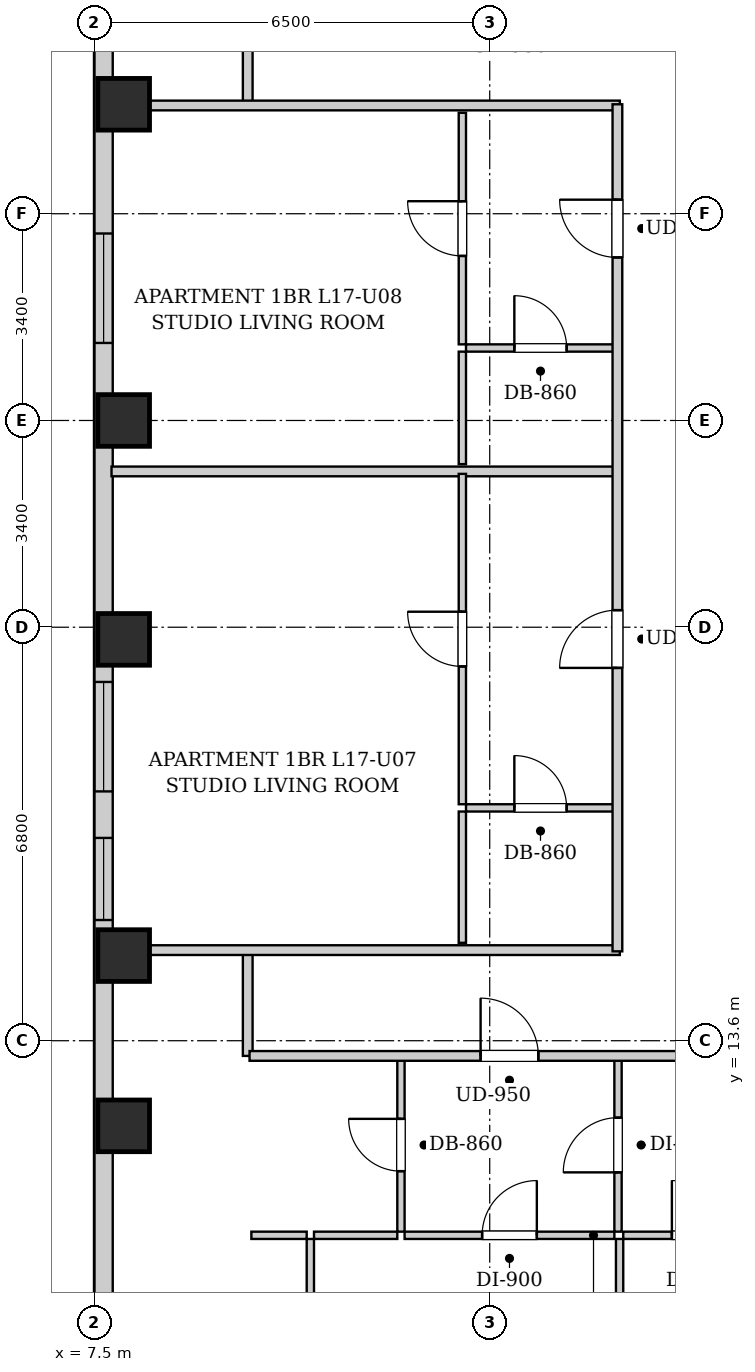
"""IFC4 building model, lengths in metres.
Left out: names, types, materials, properties, quantities, classifications, styles, units other than length and angle.
Written with IfcOpenShell. Run it as: python <this file> out.ifc"""

import sys

from ifc_helpers import new_model, si_unit, direction, frame, frame_2d, origin, origin_2d, place, context, subcontext, project, spatial, rectangle, extrude, element, fill, save


model = new_model("IFC4")
c1 = context("Model", 3, precision=1e-05, world=origin(), true_north=direction((0.0, 1.0)))
c2 = subcontext(c1, "Body", "Model", "MODEL_VIEW")
j1 = project(units=[si_unit("LENGTHUNIT", "METRE"), si_unit("PLANEANGLEUNIT", "RADIAN")], contexts=[c1])
p1 = place(None, origin())
s1 = spatial("IfcSite", under=j1, at=p1, CompositionType="ELEMENT")
p2 = place(p1, origin())
s2 = spatial("IfcBuilding", under=s1, at=p2, CompositionType="ELEMENT")
p3 = place(p2, frame((0.0, 0.0, 64.2)))
s3 = spatial("IfcBuildingStorey", under=s2, at=p3, CompositionType="ELEMENT", Elevation=64.2)
for number, where, z_axis, x_axis in (
    (1, (7.98, 12.2, 0.0), (0.0, 0.0, 1.0), (1.0, 0.0, 0.0)),
    (2, (7.98, 15.0, 0.0), (0.0, 0.0, 1.0), (1.0, 0.0, 0.0)),
    (3, (7.98, 20.2, 0.0), (0.0, 0.0, 1.0), (1.0, 0.0, 0.0)),
    (4, (7.98, 23.8, 0.0), (0.0, 0.0, 1.0), (1.0, 0.0, 0.0)),
    (5, (7.98, 29.0, 0.0), (0.0, 0.0, 1.0), (1.0, 0.0, 0.0)),
):
    element("IfcColumn", number, at=place(p3, frame(where, z_axis=z_axis, x_axis=x_axis)), inside=s3, PredefinedType="COLUMN", context=c2, shape_type="SweptSolid", body=[
        extrude(rectangle(XDim=0.85, YDim=0.85, at=origin_2d()), origin(), (0.0, 0.0, 1.0), 3.2),
    ])
p4 = place(p3, frame((7.65, 2.5, 0.0), z_axis=(0.0, 0.0, 1.0), x_axis=(0.0, 1.0, 0.0)))
e6 = element("IfcWall", 6, at=p4, inside=s3, PredefinedType="SOLIDWALL", context=c2, shape_type="SweptSolid", body=[
    extrude(rectangle(XDim=42.6, YDim=0.3, at=frame_2d((21.3, 0.0))), origin(), (0.0, 0.0, 1.0), 1.975),
])
p5 = place(p4, frame((3.15, 0.0, 0.55)))
e7 = element("IfcOpeningElement", 7, at=p5, cuts=e6, PredefinedType="OPENING", context=c2, shape_type="SweptSolid", body=[
    extrude(rectangle(XDim=1.8, YDim=1.2, at=frame_2d((0.9, 0.6))), frame((0.0, 0.16, 0.0), z_axis=(0.0, -1.0, 0.0), x_axis=(1.0, 0.0, 0.0)), (0.0, 0.0, 1.0), 0.32),
])
p6 = place(p4, frame((1.185, 0.0, 0.55)))
e8 = element("IfcOpeningElement", 8, at=p6, cuts=e6, PredefinedType="OPENING", context=c2, shape_type="SweptSolid", body=[
    extrude(rectangle(XDim=1.35, YDim=1.2, at=frame_2d((0.675, 0.6))), frame((0.0, 0.16, 0.0), z_axis=(0.0, -1.0, 0.0), x_axis=(1.0, 0.0, 0.0)), (0.0, 0.0, 1.0), 0.32),
])
p7 = place(p4, frame((37.085, 0.0, 0.55)))
e9 = element("IfcOpeningElement", 9, at=p7, cuts=e6, PredefinedType="OPENING", context=c2, shape_type="SweptSolid", body=[
    extrude(rectangle(XDim=1.8, YDim=1.2, at=frame_2d((0.9, 0.6))), frame((0.0, 0.16, 0.0), z_axis=(0.0, -1.0, 0.0), x_axis=(1.0, 0.0, 0.0)), (0.0, 0.0, 1.0), 0.32),
])
p8 = place(p4, frame((31.55, 0.0, 0.55)))
e10 = element("IfcOpeningElement", 10, at=p8, cuts=e6, PredefinedType="OPENING", context=c2, shape_type="SweptSolid", body=[
    extrude(rectangle(XDim=1.35, YDim=1.2, at=frame_2d((0.675, 0.6))), frame((0.0, 0.16, 0.0), z_axis=(0.0, -1.0, 0.0), x_axis=(1.0, 0.0, 0.0)), (0.0, 0.0, 1.0), 0.32),
])
p9 = place(p4, frame((15.2, 0.0, 0.55)))
e11 = element("IfcOpeningElement", 11, at=p9, cuts=e6, PredefinedType="OPENING", context=c2, shape_type="SweptSolid", body=[
    extrude(rectangle(XDim=1.8, YDim=1.2, at=frame_2d((0.9, 0.6))), frame((0.0, 0.16, 0.0), z_axis=(0.0, -1.0, 0.0), x_axis=(1.0, 0.0, 0.0)), (0.0, 0.0, 1.0), 0.32),
])
p10 = place(p4, frame((13.085, 0.0, 0.55)))
e12 = element("IfcOpeningElement", 12, at=p10, cuts=e6, PredefinedType="OPENING", context=c2, shape_type="SweptSolid", body=[
    extrude(rectangle(XDim=1.35, YDim=1.2, at=frame_2d((0.675, 0.6))), frame((0.0, 0.16, 0.0), z_axis=(0.0, -1.0, 0.0), x_axis=(1.0, 0.0, 0.0)), (0.0, 0.0, 1.0), 0.32),
])
p11 = place(p4, frame((22.575, 0.0, 0.55)))
e13 = element("IfcOpeningElement", 13, at=p11, cuts=e6, PredefinedType="OPENING", context=c2, shape_type="SweptSolid", body=[
    extrude(rectangle(XDim=1.8, YDim=1.2, at=frame_2d((0.9, 0.6))), frame((0.0, 0.16, 0.0), z_axis=(0.0, -1.0, 0.0), x_axis=(1.0, 0.0, 0.0)), (0.0, 0.0, 1.0), 0.32),
])
for number, where, z_axis, x_axis in (
    (14, (10.02, 13.35, 0.0), (0.0, 0.0, 1.0), (0.0, 1.0, 0.0)),
    (15, (10.02, 28.98, 0.0), (0.0, 0.0, 1.0), (0.0, 1.0, 0.0)),
):
    element("IfcWall", number, at=place(p3, frame(where, z_axis=z_axis, x_axis=x_axis)), inside=s3, PredefinedType="PARTITIONING", context=c2, shape_type="SweptSolid", body=[
        extrude(rectangle(XDim=1.74, YDim=0.16, at=frame_2d((0.87, 0.0))), origin(), (0.0, 0.0, 1.0), 2.94),
    ])
for number, where, z_axis, x_axis in (
    (16, (7.78, 15.09, 0.0), (0.0, 0.0, 1.0), (1.0, 0.0, 0.0)),
    (17, (7.78, 28.98, 0.0), (0.0, 0.0, 1.0), (1.0, 0.0, 0.0)),
):
    element("IfcWall", number, at=place(p3, frame(where, z_axis=z_axis, x_axis=x_axis)), inside=s3, PredefinedType="PARTITIONING", context=c2, shape_type="SweptSolid", body=[
        extrude(rectangle(XDim=8.36, YDim=0.16, at=frame_2d((4.18, 0.0))), origin(), (0.0, 0.0, 1.0), 2.232),
    ])
p12 = place(p3, frame((12.54, 10.46, 0.0), z_axis=(0.0, 0.0, 1.0), x_axis=(0.0, 1.0, 0.0)))
e18 = element("IfcWall", 18, at=p12, inside=s3, PredefinedType="PARTITIONING", context=c2, shape_type="SweptSolid", body=[
    extrude(rectangle(XDim=2.85, YDim=0.12, at=frame_2d((1.425, 0.0))), origin(), (0.0, 0.0, 1.0), 2.94),
])
p13 = place(p12, frame((0.995, 0.0, 0.0)))
e19 = element("IfcOpeningElement", 19, at=p13, cuts=e18, PredefinedType="OPENING", context=c2, shape_type="SweptSolid", body=[
    extrude(rectangle(XDim=0.86, YDim=2.05, at=frame_2d((0.43, 1.025))), frame((0.0, 0.07, 0.0), z_axis=(0.0, -1.0, 0.0), x_axis=(1.0, 0.0, 0.0)), (0.0, 0.0, 1.0), 0.14),
])
p14 = place(p3, frame((10.08, 10.4, 0.0), z_axis=(0.0, 0.0, 1.0), x_axis=(1.0, 0.0, 0.0)))
e20 = element("IfcWall", 20, at=p14, inside=s3, PredefinedType="PARTITIONING", context=c2, shape_type="SweptSolid", body=[
    extrude(rectangle(XDim=0.91, YDim=0.12, at=frame_2d((0.455, 0.0))), origin(), (0.0, 0.0, 1.0), 2.94),
])
p15 = place(p3, frame((11.11, 10.4, 0.0), z_axis=(0.0, 0.0, 1.0), x_axis=(1.0, 0.0, 0.0)))
e21 = element("IfcWall", 21, at=p15, inside=s3, PredefinedType="PARTITIONING", context=c2, shape_type="SweptSolid", body=[
    extrude(rectangle(XDim=1.37, YDim=0.12, at=frame_2d((0.685, 0.0))), origin(), (0.0, 0.0, 1.0), 2.94),
])
p16 = place(p3, frame((16.11, 10.46, 0.0), z_axis=(0.0, 0.0, 1.0), x_axis=(0.0, 1.0, 0.0)))
e22 = element("IfcWall", 22, at=p16, inside=s3, PredefinedType="PARTITIONING", context=c2, shape_type="SweptSolid", body=[
    extrude(rectangle(XDim=2.85, YDim=0.12, at=frame_2d((1.425, 0.0))), origin(), (0.0, 0.0, 1.0), 2.94),
])
p17 = place(p16, frame((0.975, 0.0, 0.0)))
e23 = element("IfcOpeningElement", 23, at=p17, cuts=e22, PredefinedType="OPENING", context=c2, shape_type="SweptSolid", body=[
    extrude(rectangle(XDim=0.9, YDim=2.05, at=frame_2d((0.45, 1.025))), frame((0.0, 0.07, 0.0), z_axis=(0.0, -1.0, 0.0), x_axis=(1.0, 0.0, 0.0)), (0.0, 0.0, 1.0), 0.14),
])
p18 = place(p3, frame((12.6, 10.4, 0.0), z_axis=(0.0, 0.0, 1.0), x_axis=(1.0, 0.0, 0.0)))
e24 = element("IfcWall", 24, at=p18, inside=s3, PredefinedType="PARTITIONING", context=c2, shape_type="SweptSolid", body=[
    extrude(rectangle(XDim=3.45, YDim=0.12, at=frame_2d((1.725, 0.0))), origin(), (0.0, 0.0, 1.0), 2.94),
])
p19 = place(p18, frame((1.275, 0.0, 0.0)))
e25 = element("IfcOpeningElement", 25, at=p19, cuts=e24, PredefinedType="OPENING", context=c2, shape_type="SweptSolid", body=[
    extrude(rectangle(XDim=0.9, YDim=2.05, at=frame_2d((0.45, 1.025))), frame((0.0, 0.07, 0.0), z_axis=(0.0, -1.0, 0.0), x_axis=(1.0, 0.0, 0.0)), (0.0, 0.0, 1.0), 0.14),
])
p20 = place(p3, frame((16.196, 10.4, 0.0), z_axis=(0.0, 0.0, 1.0), x_axis=(1.0, 0.0, 0.0)))
e26 = element("IfcWall", 26, at=p20, inside=s3, PredefinedType="PARTITIONING", context=c2, shape_type="SweptSolid", body=[
    extrude(rectangle(XDim=2.5, YDim=0.12, at=frame_2d((1.25, 0.0))), origin(), (0.0, 0.0, 1.0), 2.94),
])
p21 = place(p20, frame((0.8, 0.0, 0.0)))
e27 = element("IfcOpeningElement", 27, at=p21, cuts=e26, PredefinedType="OPENING", context=c2, shape_type="SweptSolid", body=[
    extrude(rectangle(XDim=0.9, YDim=2.05, at=frame_2d((0.45, 1.025))), frame((0.0, 0.07, 0.0), z_axis=(0.0, -1.0, 0.0), x_axis=(1.0, 0.0, 0.0)), (0.0, 0.0, 1.0), 0.14),
])
p22 = place(p3, frame((11.05, 0.28, 0.0), z_axis=(0.0, 0.0, 1.0), x_axis=(0.0, 1.0, 0.0)))
e28 = element("IfcWall", 28, at=p22, inside=s3, PredefinedType="PARTITIONING", context=c2, shape_type="SweptSolid", body=[
    extrude(rectangle(XDim=10.06, YDim=0.12, at=frame_2d((5.03, 0.0))), origin(), (0.0, 0.0, 1.0), 2.94),
])
p23 = place(p22, frame((4.565, 0.0, 0.0)))
e29 = element("IfcOpeningElement", 29, at=p23, cuts=e28, PredefinedType="OPENING", context=c2, shape_type="SweptSolid", body=[
    extrude(rectangle(XDim=0.9, YDim=2.05, at=frame_2d((0.45, 1.025))), frame((0.0, 0.07, 0.0), z_axis=(0.0, -1.0, 0.0), x_axis=(1.0, 0.0, 0.0)), (0.0, 0.0, 1.0), 0.14),
])
p24 = place(p3, frame((16.136, 2.43, 0.0), z_axis=(0.0, 0.0, 1.0), x_axis=(0.0, 1.0, 0.0)))
e30 = element("IfcWall", 30, at=p24, inside=s3, PredefinedType="PARTITIONING", context=c2, shape_type="SweptSolid", body=[
    extrude(rectangle(XDim=7.91, YDim=0.12, at=frame_2d((3.955, 0.0))), origin(), (0.0, 0.0, 1.0), 2.94),
])
p25 = place(p24, frame((3.505, 0.0, 0.0)))
e31 = element("IfcOpeningElement", 31, at=p25, cuts=e30, PredefinedType="OPENING", context=c2, shape_type="SweptSolid", body=[
    extrude(rectangle(XDim=0.9, YDim=2.05, at=frame_2d((0.45, 1.025))), frame((0.0, 0.07, 0.0), z_axis=(0.0, -1.0, 0.0), x_axis=(1.0, 0.0, 0.0)), (0.0, 0.0, 1.0), 0.14),
])
p26 = place(p3, frame((7.78, 22.962, 0.0), z_axis=(0.0, 0.0, 1.0), x_axis=(1.0, 0.0, 0.0)))
e32 = element("IfcWall", 32, at=p26, inside=s3, PredefinedType="PARTITIONING", context=c2, shape_type="SweptSolid", body=[
    extrude(rectangle(XDim=8.28, YDim=0.16, at=frame_2d((4.14, 0.0))), origin(), (0.0, 0.0, 1.0), 2.94),
])
p27 = place(p3, frame((13.61, 17.429, 0.0), z_axis=(0.0, 0.0, 1.0), x_axis=(1.0, 0.0, 0.0)))
e33 = element("IfcWall", 33, at=p27, inside=s3, PredefinedType="PARTITIONING", context=c2, shape_type="SweptSolid", body=[
    extrude(rectangle(XDim=2.45, YDim=0.12, at=frame_2d((1.225, 0.0))), origin(), (0.0, 0.0, 1.0), 2.94),
])
p28 = place(p27, frame((0.795, 0.0, 0.0)))
e34 = element("IfcOpeningElement", 34, at=p28, cuts=e33, PredefinedType="OPENING", context=c2, shape_type="SweptSolid", body=[
    extrude(rectangle(XDim=0.86, YDim=2.05, at=frame_2d((0.43, 1.025))), frame((0.0, 0.07, 0.0), z_axis=(0.0, -1.0, 0.0), x_axis=(1.0, 0.0, 0.0)), (0.0, 0.0, 1.0), 0.14),
])
p29 = place(p3, frame((13.55, 15.21, 0.0), z_axis=(0.0, 0.0, 1.0), x_axis=(0.0, 1.0, 0.0)))
e35 = element("IfcWall", 35, at=p29, inside=s3, PredefinedType="PARTITIONING", context=c2, shape_type="SweptSolid", body=[
    extrude(rectangle(XDim=2.159, YDim=0.12, at=frame_2d((1.08, 0.0))), origin(), (0.0, 0.0, 1.0), 2.94),
])
p30 = place(p3, frame((13.55, 17.489, 0.0), z_axis=(0.0, 0.0, 1.0), x_axis=(0.0, 1.0, 0.0)))
e36 = element("IfcWall", 36, at=p30, inside=s3, PredefinedType="PARTITIONING", context=c2, shape_type="SweptSolid", body=[
    extrude(rectangle(XDim=5.433, YDim=0.12, at=frame_2d((2.717, 0.0))), origin(), (0.0, 0.0, 1.0), 2.94),
])
p31 = place(p30, frame((2.266, 0.0, 0.0)))
e37 = element("IfcOpeningElement", 37, at=p31, cuts=e36, PredefinedType="OPENING", context=c2, shape_type="SweptSolid", body=[
    extrude(rectangle(XDim=0.9, YDim=2.05, at=frame_2d((0.45, 1.025))), frame((0.0, 0.07, 0.0), z_axis=(0.0, -1.0, 0.0), x_axis=(1.0, 0.0, 0.0)), (0.0, 0.0, 1.0), 0.14),
])
p32 = place(p3, frame((13.61, 24.992, 0.0), z_axis=(0.0, 0.0, 1.0), x_axis=(1.0, 0.0, 0.0)))
e38 = element("IfcWall", 38, at=p32, inside=s3, PredefinedType="PARTITIONING", context=c2, shape_type="SweptSolid", body=[
    extrude(rectangle(XDim=2.45, YDim=0.12, at=frame_2d((1.225, 0.0))), origin(), (0.0, 0.0, 1.0), 2.94),
])
p33 = place(p32, frame((0.795, 0.0, 0.0)))
e39 = element("IfcOpeningElement", 39, at=p33, cuts=e38, PredefinedType="OPENING", context=c2, shape_type="SweptSolid", body=[
    extrude(rectangle(XDim=0.86, YDim=2.05, at=frame_2d((0.43, 1.025))), frame((0.0, 0.07, 0.0), z_axis=(0.0, -1.0, 0.0), x_axis=(1.0, 0.0, 0.0)), (0.0, 0.0, 1.0), 0.14),
])
p34 = place(p3, frame((13.55, 23.082, 0.0), z_axis=(0.0, 0.0, 1.0), x_axis=(0.0, 1.0, 0.0)))
e40 = element("IfcWall", 40, at=p34, inside=s3, PredefinedType="PARTITIONING", context=c2, shape_type="SweptSolid", body=[
    extrude(rectangle(XDim=1.85, YDim=0.12, at=frame_2d((0.925, 0.0))), origin(), (0.0, 0.0, 1.0), 2.94),
])
p35 = place(p3, frame((13.55, 25.052, 0.0), z_axis=(0.0, 0.0, 1.0), x_axis=(0.0, 1.0, 0.0)))
e41 = element("IfcWall", 41, at=p35, inside=s3, PredefinedType="PARTITIONING", context=c2, shape_type="SweptSolid", body=[
    extrude(rectangle(XDim=3.808, YDim=0.12, at=frame_2d((1.904, 0.0))), origin(), (0.0, 0.0, 1.0), 2.94),
])
p36 = place(p35, frame((1.454, 0.0, 0.0)))
e42 = element("IfcOpeningElement", 42, at=p36, cuts=e41, PredefinedType="OPENING", context=c2, shape_type="SweptSolid", body=[
    extrude(rectangle(XDim=0.9, YDim=2.05, at=frame_2d((0.45, 1.025))), frame((0.0, 0.07, 0.0), z_axis=(0.0, -1.0, 0.0), x_axis=(1.0, 0.0, 0.0)), (0.0, 0.0, 1.0), 0.14),
])
p37 = place(p3, frame((10.05, 13.35, 0.0), z_axis=(0.0, 0.0, 1.0), x_axis=(1.0, 0.0, 0.0)))
e43 = element("IfcWall", 43, at=p37, inside=s3, PredefinedType="PARTITIONING", context=c2, shape_type="SweptSolid", body=[
    extrude(rectangle(XDim=33.9, YDim=0.16, at=frame_2d((16.95, 0.0))), origin(), (0.0, 0.0, 1.0), 2.94),
])
p38 = place(p37, frame((3.8, 0.0, 0.0)))
e44 = element("IfcOpeningElement", 44, at=p38, cuts=e43, PredefinedType="OPENING", context=c2, shape_type="SweptSolid", body=[
    extrude(rectangle(XDim=0.95, YDim=2.1, at=frame_2d((0.475, 1.05))), frame((0.0, 0.09, 0.0), z_axis=(0.0, -1.0, 0.0), x_axis=(1.0, 0.0, 0.0)), (0.0, 0.0, 1.0), 0.18),
])
p39 = place(p37, frame((13.071, 0.0, 0.0)))
e45 = element("IfcOpeningElement", 45, at=p39, cuts=e43, PredefinedType="OPENING", context=c2, shape_type="SweptSolid", body=[
    extrude(rectangle(XDim=0.95, YDim=2.1, at=frame_2d((0.475, 1.05))), frame((0.0, 0.09, 0.0), z_axis=(0.0, -1.0, 0.0), x_axis=(1.0, 0.0, 0.0)), (0.0, 0.0, 1.0), 0.18),
])
p40 = place(p3, frame((16.1, 15.07, 0.0), z_axis=(0.0, 0.0, 1.0), x_axis=(0.0, 1.0, 0.0)))
e46 = element("IfcWall", 46, at=p40, inside=s3, PredefinedType="PARTITIONING", context=c2, shape_type="SweptSolid", body=[
    extrude(rectangle(XDim=13.93, YDim=0.16, at=frame_2d((6.965, 0.0))), origin(), (0.0, 0.0, 1.0), 2.94),
])
p41 = place(p40, frame((4.661, 0.0, 0.0)))
e47 = element("IfcOpeningElement", 47, at=p41, cuts=e46, PredefinedType="OPENING", context=c2, shape_type="SweptSolid", body=[
    extrude(rectangle(XDim=0.95, YDim=2.1, at=frame_2d((0.475, 1.05))), frame((0.0, 0.09, 0.0), z_axis=(0.0, -1.0, 0.0), x_axis=(1.0, 0.0, 0.0)), (0.0, 0.0, 1.0), 0.18),
])
p42 = place(p40, frame((11.411, 0.0, 0.0)))
e48 = element("IfcOpeningElement", 48, at=p42, cuts=e46, PredefinedType="OPENING", context=c2, shape_type="SweptSolid", body=[
    extrude(rectangle(XDim=0.95, YDim=2.1, at=frame_2d((0.475, 1.05))), frame((0.0, 0.09, 0.0), z_axis=(0.0, -1.0, 0.0), x_axis=(1.0, 0.0, 0.0)), (0.0, 0.0, 1.0), 0.18),
])
p43 = place(p13, origin())
e49 = element("IfcDoor", 49, at=p43, inside=s3, OperationType="SINGLE_SWING_RIGHT", PredefinedType="DOOR", context=c2, shape_type="SweptSolid", body=[
    extrude(rectangle(XDim=0.86, YDim=2.05, at=frame_2d((0.43, 1.025))), frame((0.0, 0.025, 0.0), z_axis=(0.0, -1.0, 0.0), x_axis=(1.0, 0.0, 0.0)), (0.0, 0.0, 1.0), 0.05),
])
fill(e19, e49)
p44 = place(p17, origin())
e50 = element("IfcDoor", 50, at=p44, inside=s3, OperationType="SINGLE_SWING_LEFT", PredefinedType="DOOR", context=c2, shape_type="SweptSolid", body=[
    extrude(rectangle(XDim=0.9, YDim=2.05, at=frame_2d((0.45, 1.025))), frame((0.0, 0.025, 0.0), z_axis=(0.0, -1.0, 0.0), x_axis=(1.0, 0.0, 0.0)), (0.0, 0.0, 1.0), 0.05),
])
fill(e23, e50)
p45 = place(p19, origin())
e51 = element("IfcDoor", 51, at=p45, inside=s3, OperationType="SINGLE_SWING_RIGHT", PredefinedType="DOOR", context=c2, shape_type="SweptSolid", body=[
    extrude(rectangle(XDim=0.9, YDim=2.05, at=frame_2d((0.45, 1.025))), frame((0.0, 0.025, 0.0), z_axis=(0.0, -1.0, 0.0), x_axis=(1.0, 0.0, 0.0)), (0.0, 0.0, 1.0), 0.05),
])
fill(e25, e51)
p46 = place(p21, origin())
e52 = element("IfcDoor", 52, at=p46, inside=s3, OperationType="SINGLE_SWING_LEFT", PredefinedType="DOOR", context=c2, shape_type="SweptSolid", body=[
    extrude(rectangle(XDim=0.9, YDim=2.05, at=frame_2d((0.45, 1.025))), frame((0.0, 0.025, 0.0), z_axis=(0.0, -1.0, 0.0), x_axis=(1.0, 0.0, 0.0)), (0.0, 0.0, 1.0), 0.05),
])
fill(e27, e52)
p47 = place(p28, origin())
e53 = element("IfcDoor", 53, at=p47, inside=s3, OperationType="SINGLE_SWING_LEFT", PredefinedType="DOOR", context=c2, shape_type="SweptSolid", body=[
    extrude(rectangle(XDim=0.86, YDim=2.05, at=frame_2d((0.43, 1.025))), frame((0.0, 0.025, 0.0), z_axis=(0.0, -1.0, 0.0), x_axis=(1.0, 0.0, 0.0)), (0.0, 0.0, 1.0), 0.05),
])
fill(e34, e53)
p48 = place(p31, origin())
e54 = element("IfcDoor", 54, at=p48, inside=s3, OperationType="SINGLE_SWING_RIGHT", PredefinedType="DOOR", context=c2, shape_type="SweptSolid", body=[
    extrude(rectangle(XDim=0.9, YDim=2.05, at=frame_2d((0.45, 1.025))), frame((0.0, 0.025, 0.0), z_axis=(0.0, -1.0, 0.0), x_axis=(1.0, 0.0, 0.0)), (0.0, 0.0, 1.0), 0.05),
])
fill(e37, e54)
p49 = place(p33, origin())
e55 = element("IfcDoor", 55, at=p49, inside=s3, OperationType="SINGLE_SWING_LEFT", PredefinedType="DOOR", context=c2, shape_type="SweptSolid", body=[
    extrude(rectangle(XDim=0.86, YDim=2.05, at=frame_2d((0.43, 1.025))), frame((0.0, 0.025, 0.0), z_axis=(0.0, -1.0, 0.0), x_axis=(1.0, 0.0, 0.0)), (0.0, 0.0, 1.0), 0.05),
])
fill(e39, e55)
p50 = place(p36, origin())
e56 = element("IfcDoor", 56, at=p50, inside=s3, OperationType="SINGLE_SWING_RIGHT", PredefinedType="DOOR", context=c2, shape_type="SweptSolid", body=[
    extrude(rectangle(XDim=0.9, YDim=2.05, at=frame_2d((0.45, 1.025))), frame((0.0, 0.025, 0.0), z_axis=(0.0, -1.0, 0.0), x_axis=(1.0, 0.0, 0.0)), (0.0, 0.0, 1.0), 0.05),
])
fill(e42, e56)
p51 = place(p38, origin())
e57 = element("IfcDoor", 57, at=p51, inside=s3, OperationType="SINGLE_SWING_LEFT", PredefinedType="DOOR", context=c2, shape_type="SweptSolid", body=[
    extrude(rectangle(XDim=0.95, YDim=2.1, at=frame_2d((0.475, 1.05))), frame((0.0, 0.025, 0.0), z_axis=(0.0, -1.0, 0.0), x_axis=(1.0, 0.0, 0.0)), (0.0, 0.0, 1.0), 0.05),
])
fill(e44, e57)
p52 = place(p41, origin())
e58 = element("IfcDoor", 58, at=p52, inside=s3, OperationType="SINGLE_SWING_LEFT", PredefinedType="DOOR", context=c2, shape_type="SweptSolid", body=[
    extrude(rectangle(XDim=0.95, YDim=2.1, at=frame_2d((0.475, 1.05))), frame((0.0, 0.025, 0.0), z_axis=(0.0, -1.0, 0.0), x_axis=(1.0, 0.0, 0.0)), (0.0, 0.0, 1.0), 0.05),
])
fill(e47, e58)
p53 = place(p42, origin())
e59 = element("IfcDoor", 59, at=p53, inside=s3, OperationType="SINGLE_SWING_RIGHT", PredefinedType="DOOR", context=c2, shape_type="SweptSolid", body=[
    extrude(rectangle(XDim=0.95, YDim=2.1, at=frame_2d((0.475, 1.05))), frame((0.0, 0.025, 0.0), z_axis=(0.0, -1.0, 0.0), x_axis=(1.0, 0.0, 0.0)), (0.0, 0.0, 1.0), 0.05),
])
fill(e48, e59)
p54 = place(p9, origin())
e60 = element("IfcWindow", 60, at=p54, inside=s3, PartitioningType="DOUBLE_PANEL_VERTICAL", PredefinedType="WINDOW", context=c2, shape_type="SweptSolid", body=[
    extrude(rectangle(XDim=1.8, YDim=1.2, at=frame_2d((0.9, 0.6))), frame((0.0, 0.03, 0.0), z_axis=(0.0, -1.0, 0.0), x_axis=(1.0, 0.0, 0.0)), (0.0, 0.0, 1.0), 0.06),
])
fill(e11, e60)
p55 = place(p10, origin())
e61 = element("IfcWindow", 61, at=p55, inside=s3, PartitioningType="SINGLE_PANEL", PredefinedType="WINDOW", context=c2, shape_type="SweptSolid", body=[
    extrude(rectangle(XDim=1.35, YDim=1.2, at=frame_2d((0.675, 0.6))), frame((0.0, 0.03, 0.0), z_axis=(0.0, -1.0, 0.0), x_axis=(1.0, 0.0, 0.0)), (0.0, 0.0, 1.0), 0.06),
])
fill(e12, e61)
p56 = place(p11, origin())
e62 = element("IfcWindow", 62, at=p56, inside=s3, PartitioningType="DOUBLE_PANEL_VERTICAL", PredefinedType="WINDOW", context=c2, shape_type="SweptSolid", body=[
    extrude(rectangle(XDim=1.8, YDim=1.2, at=frame_2d((0.9, 0.6))), frame((0.0, 0.03, 0.0), z_axis=(0.0, -1.0, 0.0), x_axis=(1.0, 0.0, 0.0)), (0.0, 0.0, 1.0), 0.06),
])
fill(e13, e62)
save(model, sys.argv[1])
